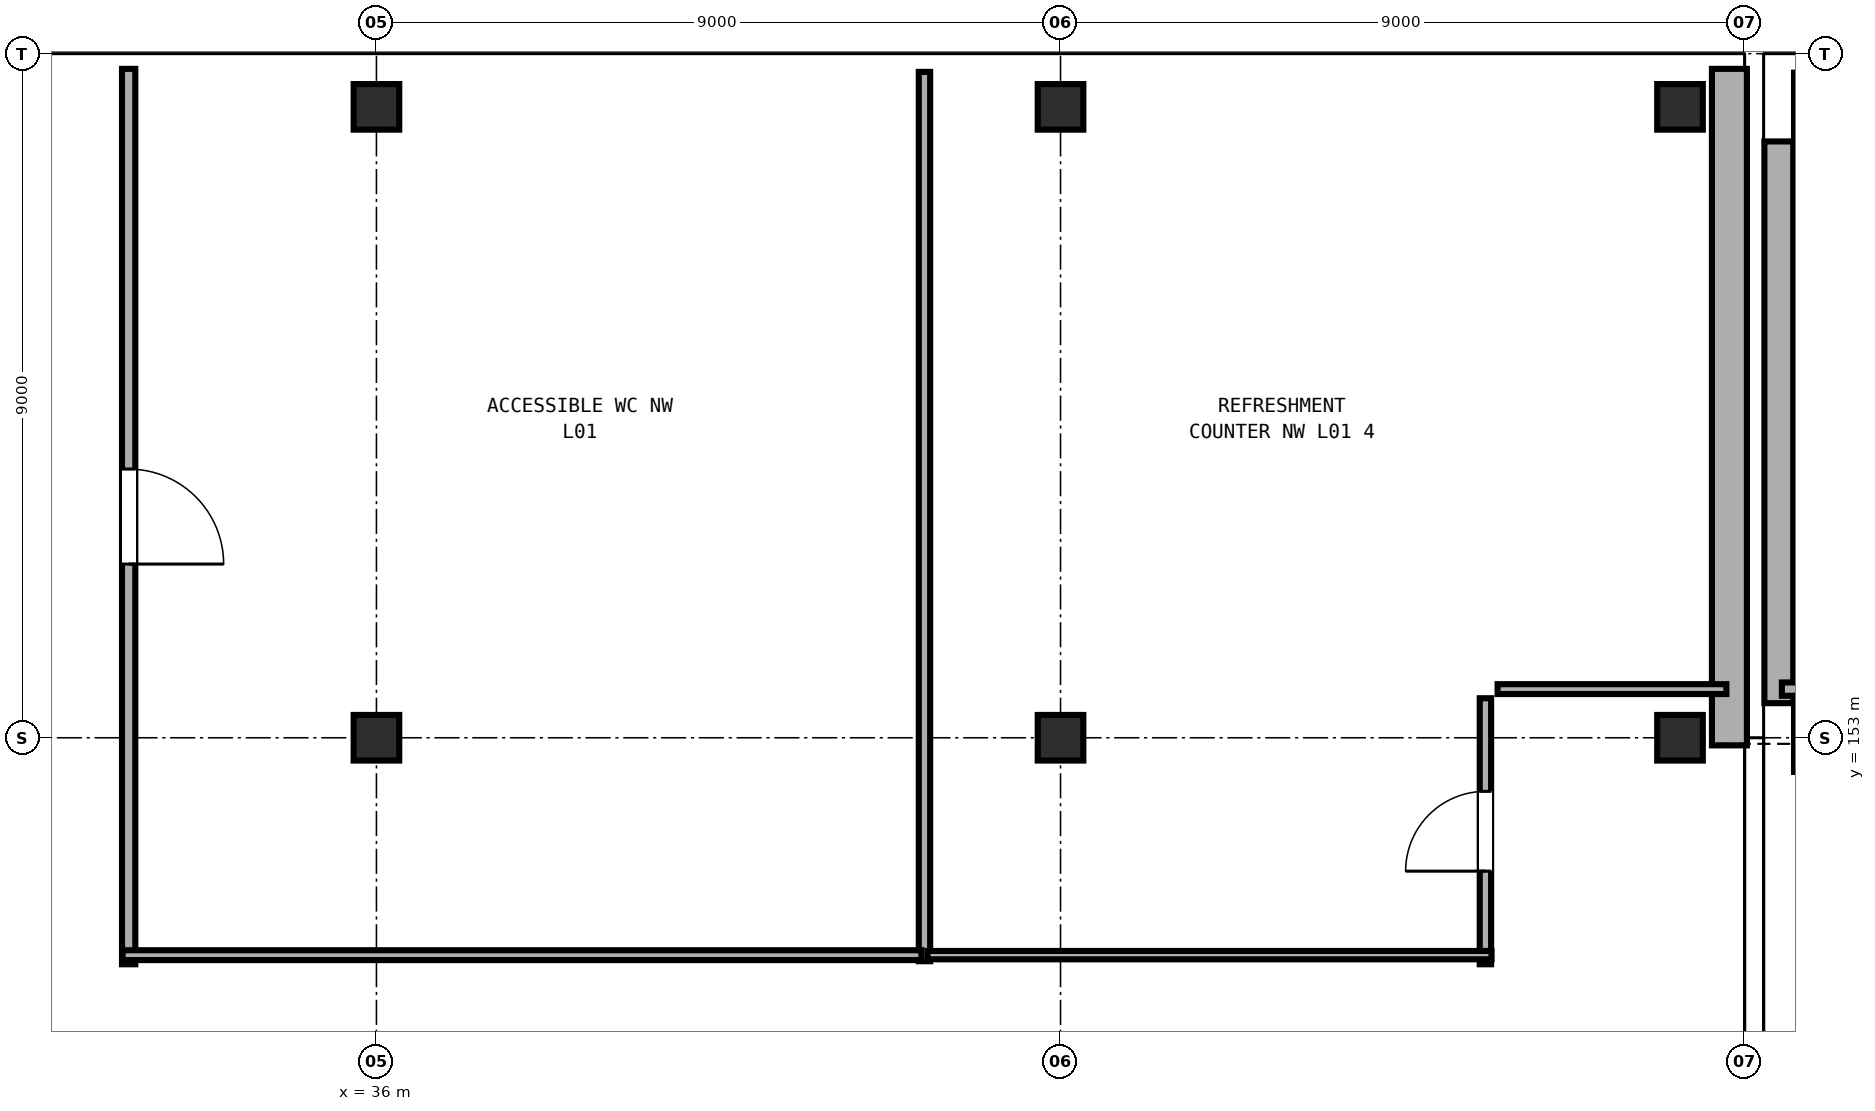
"""IFC4 building model, lengths in metres.
Left out: names, types, materials, properties, quantities, classifications, styles, units other than length and angle.
Written with IfcOpenShell. Run it as: python <this file> out.ifc"""

import sys

from ifc_helpers import new_model, si_unit, direction, frame, frame_2d, origin, origin_2d, place, context, subcontext, project, spatial, rectangle, extrude, element, fill, save


model = new_model("IFC4")
c1 = context("Model", 3, precision=1e-05, world=origin(), true_north=direction((0.0, 1.0)))
c2 = subcontext(c1, "Body", "Model", "MODEL_VIEW")
j1 = project(units=[si_unit("LENGTHUNIT", "METRE"), si_unit("PLANEANGLEUNIT", "RADIAN")], contexts=[c1])
p1 = place(None, origin())
s1 = spatial("IfcSite", under=j1, at=p1, CompositionType="ELEMENT")
p2 = place(p1, origin())
s2 = spatial("IfcBuilding", under=s1, at=p2, CompositionType="ELEMENT")
p3 = place(p2, frame((0.0, 0.0, 4.8)))
s3 = spatial("IfcBuildingStorey", under=s2, at=p3, CompositionType="ELEMENT", Elevation=4.8)
for number, where, z_axis, x_axis in (
    (1, (55.1, 153.0, 0.0), (0.0, 0.0, 1.0), (1.0, 0.0, 0.0)),
    (2, (55.1, 161.3, 0.0), (0.0, 0.0, 1.0), (1.0, 0.0, 0.0)),
):
    element("IfcColumn", number, at=place(p3, frame(where, z_axis=z_axis, x_axis=x_axis)), inside=s3, PredefinedType="COLUMN", context=c2, shape_type="SweptSolid", body=[
        extrude(rectangle(XDim=0.9, YDim=0.9, at=origin_2d()), origin(), (0.0, 0.0, 1.0), 4.8),
    ])
for number, where, z_axis, x_axis in (
    (3, (36.0, 153.0, 0.0), (0.0, 0.0, 1.0), (1.0, 0.0, 0.0)),
    (4, (36.0, 161.3, 0.0), (0.0, 0.0, 1.0), (1.0, 0.0, 0.0)),
    (5, (45.0, 153.0, 0.0), (0.0, 0.0, 1.0), (1.0, 0.0, 0.0)),
    (6, (45.0, 161.3, 0.0), (0.0, 0.0, 1.0), (1.0, 0.0, 0.0)),
    (7, (53.15, 153.0, 0.0), (0.0, 0.0, 1.0), (1.0, 0.0, 0.0)),
    (8, (53.15, 161.3, 0.0), (0.0, 0.0, 1.0), (1.0, 0.0, 0.0)),
):
    element("IfcColumn", number, at=place(p3, frame(where, z_axis=z_axis, x_axis=x_axis)), inside=s3, PredefinedType="COLUMN", context=c2, shape_type="SweptSolid", body=[
        extrude(rectangle(XDim=0.6, YDim=0.6, at=origin_2d()), origin(), (0.0, 0.0, 1.0), 4.8),
    ])
p4 = place(p3, frame((54.45, 153.455, 0.0), z_axis=(0.0, 0.0, 1.0), x_axis=(0.0, 1.0, 0.0)))
e9 = element("IfcWall", 9, at=p4, inside=s3, PredefinedType="SOLIDWALL", context=c2, shape_type="SweptSolid", body=[
    extrude(rectangle(XDim=7.39, YDim=0.38, at=frame_2d((3.695, 0.0))), origin(), (0.0, 0.0, 1.0), 3.28),
])
p5 = place(p3, frame((27.305, 161.8, 0.0), z_axis=(0.0, 0.0, 1.0), x_axis=(1.0, 0.0, 0.0)))
e10 = element("IfcWall", 10, at=p5, inside=s3, PredefinedType="SOLIDWALL", context=c2, shape_type="SweptSolid", body=[
    extrude(rectangle(XDim=8.39, YDim=0.38, at=frame_2d((4.195, 0.0))), origin(), (0.0, 0.0, 1.0), 3.58),
])
p6 = place(p5, frame((3.545, 0.0, 0.9)))
e11 = element("IfcOpeningElement", 11, at=p6, cuts=e10, PredefinedType="OPENING", context=c2, shape_type="SweptSolid", body=[
    extrude(rectangle(XDim=1.3, YDim=1.5, at=frame_2d((0.65, 0.75))), frame((0.0, 0.2, 0.0), z_axis=(0.0, -1.0, 0.0), x_axis=(1.0, 0.0, 0.0)), (0.0, 0.0, 1.0), 0.4),
])
p7 = place(p3, frame((36.305, 161.8, 0.0), z_axis=(0.0, 0.0, 1.0), x_axis=(1.0, 0.0, 0.0)))
e12 = element("IfcWall", 12, at=p7, inside=s3, PredefinedType="SOLIDWALL", context=c2, shape_type="SweptSolid", body=[
    extrude(rectangle(XDim=8.39, YDim=0.36, at=frame_2d((4.195, 0.0))), origin(), (0.0, 0.0, 1.0), 3.28),
])
p8 = place(p3, frame((45.305, 161.8, 0.0), z_axis=(0.0, 0.0, 1.0), x_axis=(1.0, 0.0, 0.0)))
e13 = element("IfcWall", 13, at=p8, inside=s3, PredefinedType="SOLIDWALL", context=c2, shape_type="SweptSolid", body=[
    extrude(rectangle(XDim=7.54, YDim=0.34, at=frame_2d((3.77, 0.0))), origin(), (0.0, 0.0, 1.0), 3.28),
])
p9 = place(p3, frame((53.8, 161.8, 0.0), z_axis=(0.0, 0.0, 1.0), x_axis=(0.0, -1.0, 0.0)))
e14 = element("IfcWall", 14, at=p9, inside=s3, PredefinedType="SOLIDWALL", context=c2, shape_type="SweptSolid", body=[
    extrude(rectangle(XDim=8.9, YDim=0.46, at=frame_2d((4.45, 0.0))), origin(), (0.0, 0.0, 1.0), 3.28),
])
p10 = place(p3, frame((60.48, 153.64, 0.0), z_axis=(0.0, 0.0, 1.0), x_axis=(-1.0, 0.0, 0.0)))
e15 = element("IfcWall", 15, at=p10, inside=s3, PredefinedType="PARTITIONING", context=c2, shape_type="SweptSolid", body=[
    extrude(rectangle(XDim=5.99, YDim=0.175, at=frame_2d((2.995, 0.0))), origin(), (0.0, 0.0, 1.0), 3.28),
])
p11 = place(p3, frame((32.74, 161.8, 0.0), z_axis=(0.0, 0.0, 1.0), x_axis=(0.0, -1.0, 0.0)))
e16 = element("IfcWall", 16, at=p11, inside=s3, PredefinedType="PARTITIONING", context=c2, shape_type="SweptSolid", body=[
    extrude(rectangle(XDim=11.78, YDim=0.175, at=frame_2d((5.89, 0.0))), origin(), (0.0, 0.0, 1.0), 3.28),
])
p12 = place(p11, frame((5.265, 0.0, 0.0)))
e17 = element("IfcOpeningElement", 17, at=p12, cuts=e16, PredefinedType="OPENING", context=c2, shape_type="SweptSolid", body=[
    extrude(rectangle(XDim=1.25, YDim=2.15, at=frame_2d((0.625, 1.075))), frame((0.0, 0.097, 0.0), z_axis=(0.0, -1.0, 0.0), x_axis=(1.0, 0.0, 0.0)), (0.0, 0.0, 1.0), 0.195),
])
p13 = place(p3, frame((43.21, 161.76, 0.0), z_axis=(0.0, 0.0, 1.0), x_axis=(0.0, -1.0, 0.0)))
e18 = element("IfcWall", 18, at=p13, inside=s3, PredefinedType="PARTITIONING", context=c2, shape_type="SweptSolid", body=[
    extrude(rectangle(XDim=11.7, YDim=0.15, at=frame_2d((5.85, 0.0))), origin(), (0.0, 0.0, 1.0), 3.28),
])
p14 = place(p3, frame((43.17, 150.14, 0.0), z_axis=(0.0, 0.0, 1.0), x_axis=(-1.0, 0.0, 0.0)))
e19 = element("IfcWall", 19, at=p14, inside=s3, PredefinedType="PARTITIONING", context=c2, shape_type="SweptSolid", body=[
    extrude(rectangle(XDim=10.51, YDim=0.13, at=frame_2d((5.255, 0.0))), origin(), (0.0, 0.0, 1.0), 3.28),
])
p15 = place(p3, frame((50.59, 150.02, 0.0), z_axis=(0.0, 0.0, 1.0), x_axis=(0.0, 1.0, 0.0)))
e20 = element("IfcWall", 20, at=p15, inside=s3, PredefinedType="PARTITIONING", context=c2, shape_type="SweptSolid", body=[
    extrude(rectangle(XDim=3.5, YDim=0.15, at=frame_2d((1.75, 0.0))), origin(), (0.0, 0.0, 1.0), 3.28),
])
p16 = place(p15, frame((1.225, 0.0, 0.0)))
e21 = element("IfcOpeningElement", 21, at=p16, cuts=e20, PredefinedType="OPENING", context=c2, shape_type="SweptSolid", body=[
    extrude(rectangle(XDim=1.05, YDim=2.1, at=frame_2d((0.525, 1.05))), frame((0.0, 0.085, 0.0), z_axis=(0.0, -1.0, 0.0), x_axis=(1.0, 0.0, 0.0)), (0.0, 0.0, 1.0), 0.17),
])
p17 = place(p3, frame((53.76, 153.64, 0.0), z_axis=(0.0, 0.0, 1.0), x_axis=(-1.0, 0.0, 0.0)))
e22 = element("IfcWall", 22, at=p17, inside=s3, PredefinedType="PARTITIONING", context=c2, shape_type="SweptSolid", body=[
    extrude(rectangle(XDim=3.01, YDim=0.13, at=frame_2d((1.505, 0.0))), origin(), (0.0, 0.0, 1.0), 3.28),
])
p18 = place(p3, frame((50.67, 150.14, 0.0), z_axis=(0.0, 0.0, 1.0), x_axis=(-1.0, 0.0, 0.0)))
e23 = element("IfcWall", 23, at=p18, inside=s3, PredefinedType="PARTITIONING", context=c2, shape_type="SweptSolid", body=[
    extrude(rectangle(XDim=7.42, YDim=0.11, at=frame_2d((3.71, 0.0))), origin(), (0.0, 0.0, 1.0), 3.28),
])
p19 = place(p6, origin())
e24 = element("IfcWindow", 24, at=p19, inside=s3, PartitioningType="SINGLE_PANEL", PredefinedType="WINDOW", context=c2, shape_type="SweptSolid", body=[
    extrude(rectangle(XDim=1.3, YDim=1.5, at=frame_2d((0.65, 0.75))), frame((0.0, 0.03, 0.0), z_axis=(0.0, -1.0, 0.0), x_axis=(1.0, 0.0, 0.0)), (0.0, 0.0, 1.0), 0.06),
])
fill(e11, e24)
p20 = place(p12, origin())
e25 = element("IfcDoor", 25, at=p20, inside=s3, OperationType="SINGLE_SWING_RIGHT", PredefinedType="DOOR", context=c2, shape_type="SweptSolid", body=[
    extrude(rectangle(XDim=1.25, YDim=2.15, at=frame_2d((0.625, 1.075))), frame((0.0, 0.025, 0.0), z_axis=(0.0, -1.0, 0.0), x_axis=(1.0, 0.0, 0.0)), (0.0, 0.0, 1.0), 0.05),
])
fill(e17, e25)
p21 = place(p16, origin())
e26 = element("IfcDoor", 26, at=p21, inside=s3, OperationType="SINGLE_SWING_LEFT", PredefinedType="DOOR", context=c2, shape_type="SweptSolid", body=[
    extrude(rectangle(XDim=1.05, YDim=2.1, at=frame_2d((0.525, 1.05))), frame((0.0, 0.025, 0.0), z_axis=(0.0, -1.0, 0.0), x_axis=(1.0, 0.0, 0.0)), (0.0, 0.0, 1.0), 0.05),
])
fill(e21, e26)
save(model, sys.argv[1])
